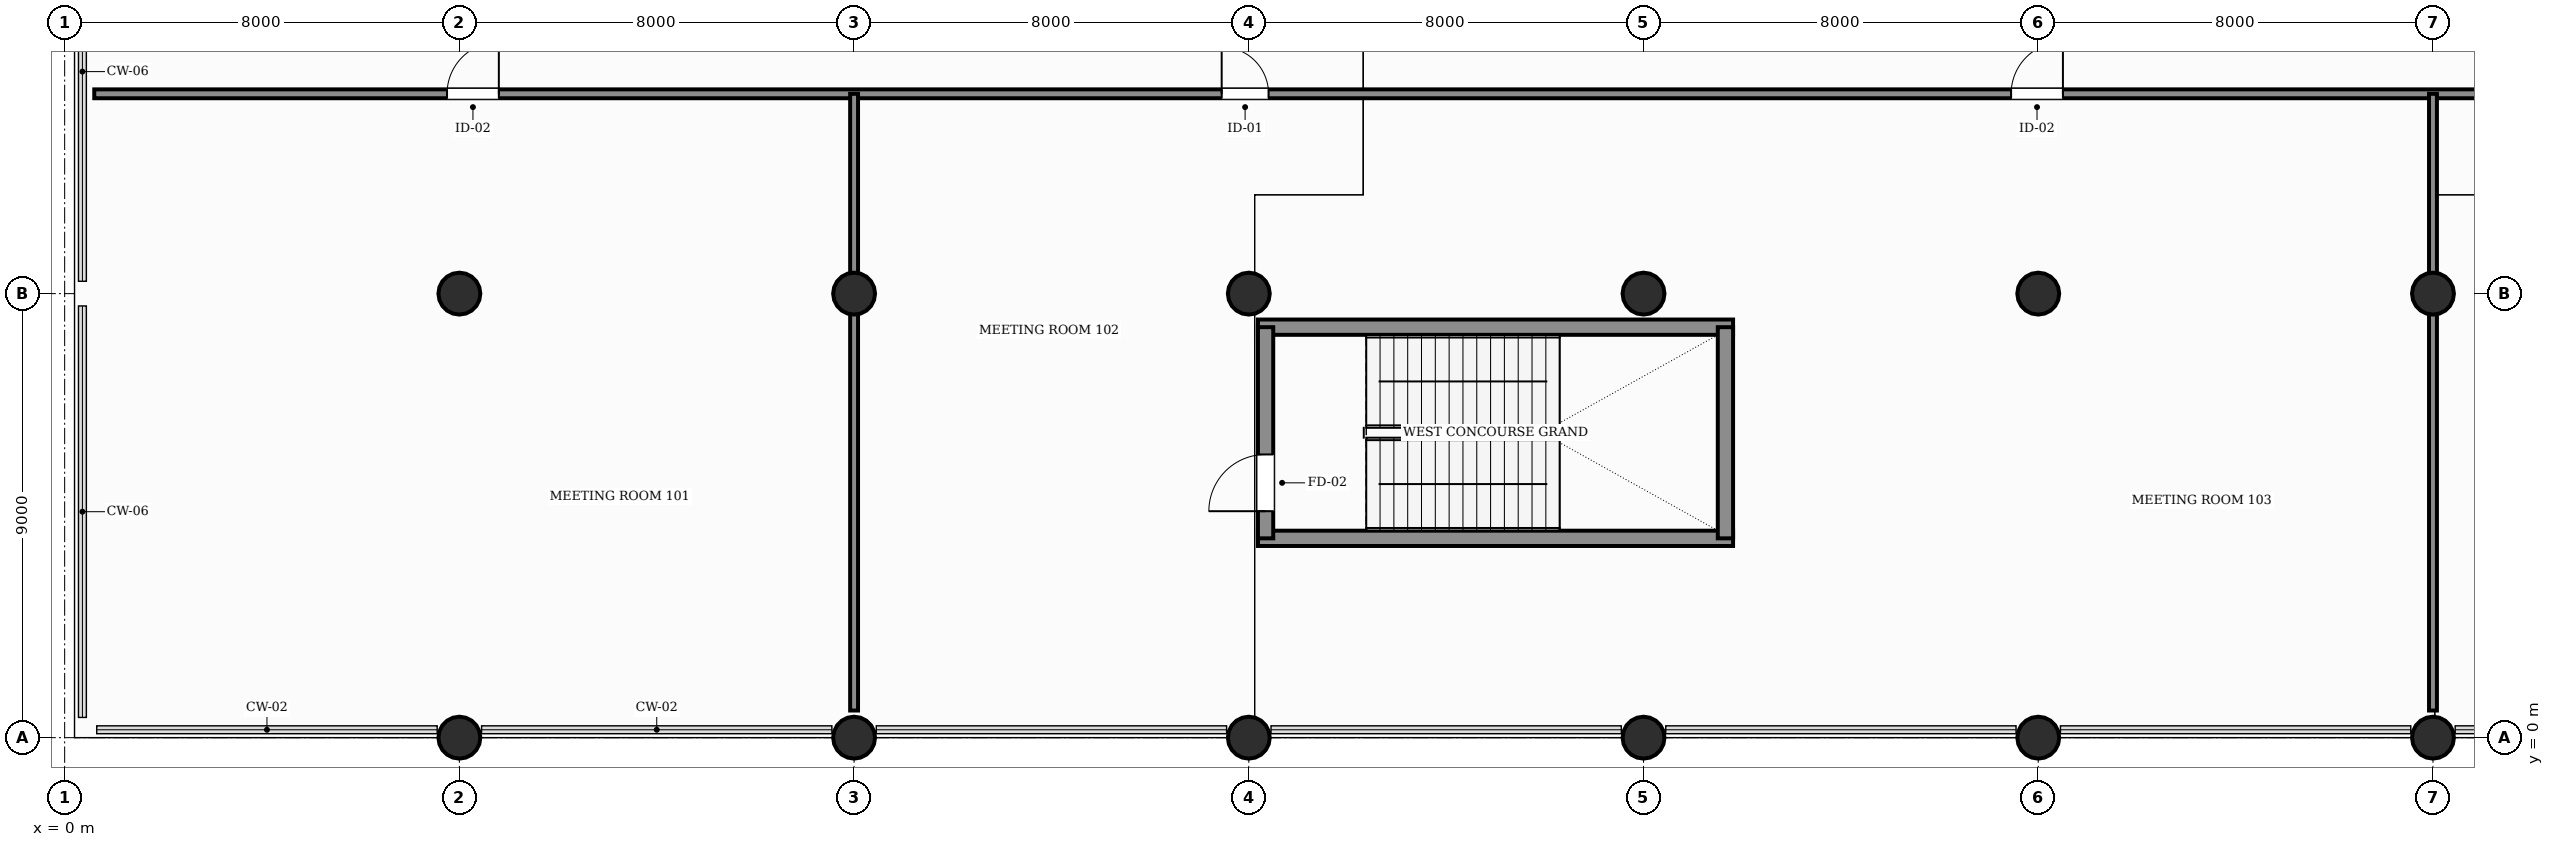
"""IFC4 building model, lengths in metres.
Left out: names, types, materials, properties, quantities, classifications, styles, units other than length and angle.
Written with IfcOpenShell. Run it as: python <this file> out.ifc"""

import sys

from ifc_helpers import new_model, si_unit, direction, frame, frame_2d, origin, origin_2d, place, context, subcontext, project, spatial, rectangle, circle, extrude, element, fill, save


model = new_model("IFC4")
c1 = context("Model", 3, precision=1e-05, world=origin(), true_north=direction((0.0, 1.0)))
c2 = subcontext(c1, "Body", "Model", "MODEL_VIEW")
j1 = project(units=[si_unit("LENGTHUNIT", "METRE"), si_unit("PLANEANGLEUNIT", "RADIAN")], contexts=[c1])
p1 = place(None, origin())
s1 = spatial("IfcSite", under=j1, at=p1, CompositionType="ELEMENT")
p2 = place(p1, origin())
s2 = spatial("IfcBuilding", under=s1, at=p2, CompositionType="ELEMENT")
p3 = place(p2, frame((0.0, 0.0, 6.0)))
s3 = spatial("IfcBuildingStorey", under=s2, at=p3, CompositionType="ELEMENT", Elevation=6.0)
for number, where, z_axis, x_axis in (
    (1, (8.0, 0.0, 0.0), (0.0, 0.0, 1.0), (1.0, 0.0, 0.0)),
    (2, (8.0, 9.0, 0.0), (0.0, 0.0, 1.0), (1.0, 0.0, 0.0)),
    (3, (16.0, 0.0, 0.0), (0.0, 0.0, 1.0), (1.0, 0.0, 0.0)),
    (4, (16.0, 9.0, 0.0), (0.0, 0.0, 1.0), (1.0, 0.0, 0.0)),
    (5, (24.0, 0.0, 0.0), (0.0, 0.0, 1.0), (1.0, 0.0, 0.0)),
    (6, (24.0, 9.0, 0.0), (0.0, 0.0, 1.0), (1.0, 0.0, 0.0)),
    (7, (32.0, 0.0, 0.0), (0.0, 0.0, 1.0), (1.0, 0.0, 0.0)),
    (8, (32.0, 9.0, 0.0), (0.0, 0.0, 1.0), (1.0, 0.0, 0.0)),
    (9, (40.0, 0.0, 0.0), (0.0, 0.0, 1.0), (1.0, 0.0, 0.0)),
    (10, (40.0, 9.0, 0.0), (0.0, 0.0, 1.0), (1.0, 0.0, 0.0)),
    (11, (48.0, 0.0, 0.0), (0.0, 0.0, 1.0), (1.0, 0.0, 0.0)),
    (12, (48.0, 9.0, 0.0), (0.0, 0.0, 1.0), (1.0, 0.0, 0.0)),
):
    element("IfcColumn", number, at=place(p3, frame(where, z_axis=z_axis, x_axis=x_axis)), inside=s3, PredefinedType="COLUMN", context=c2, shape_type="SweptSolid", body=[
        extrude(circle(Radius=0.425, at=origin_2d()), origin(), (0.0, 0.0, 1.0), 5.4),
    ])
for number, where, z_axis, x_axis in (
    (13, (24.185, 4.04, 0.0), (0.0, 0.0, 1.0), (1.0, 0.0, 0.0)),
    (14, (24.185, 8.32, 0.0), (0.0, 0.0, 1.0), (1.0, 0.0, 0.0)),
):
    element("IfcWall", number, at=place(p3, frame(where, z_axis=z_axis, x_axis=x_axis)), inside=s3, PredefinedType="SHEAR", context=c2, shape_type="SweptSolid", body=[
        extrude(rectangle(XDim=9.63, YDim=0.31, at=frame_2d((4.815, 0.0))), origin(), (0.0, 0.0, 1.0), 5.4),
    ])
p4 = place(p3, frame((24.34, 4.04, 0.0), z_axis=(0.0, 0.0, 1.0), x_axis=(0.0, 1.0, 0.0)))
e15 = element("IfcWall", 15, at=p4, inside=s3, PredefinedType="SHEAR", context=c2, shape_type="SweptSolid", body=[
    extrude(rectangle(XDim=4.28, YDim=0.31, at=frame_2d((2.14, 0.0))), origin(), (0.0, 0.0, 1.0), 5.4),
])
p5 = place(p4, frame((0.55, 0.0, 0.0)))
e16 = element("IfcOpeningElement", 16, at=p5, cuts=e15, PredefinedType="OPENING", context=c2, shape_type="SweptSolid", body=[
    extrude(rectangle(XDim=1.15, YDim=2.2, at=frame_2d((0.575, 1.1))), frame((0.0, 0.165, 0.0), z_axis=(0.0, -1.0, 0.0), x_axis=(1.0, 0.0, 0.0)), (0.0, 0.0, 1.0), 0.33),
])
p6 = place(p3, frame((33.66, 4.04, 0.0), z_axis=(0.0, 0.0, 1.0), x_axis=(0.0, 1.0, 0.0)))
e17 = element("IfcWall", 17, at=p6, inside=s3, PredefinedType="SHEAR", context=c2, shape_type="SweptSolid", body=[
    extrude(rectangle(XDim=4.28, YDim=0.31, at=frame_2d((2.14, 0.0))), origin(), (0.0, 0.0, 1.0), 5.4),
])
p7 = place(p3, frame((0.6, 13.05, 0.0), z_axis=(0.0, 0.0, 1.0), x_axis=(1.0, 0.0, 0.0)))
e18 = element("IfcWall", 18, at=p7, inside=s3, PredefinedType="PARTITIONING", context=c2, shape_type="SweptSolid", body=[
    extrude(rectangle(XDim=118.8, YDim=0.18, at=frame_2d((59.4, 0.0))), origin(), (0.0, 0.0, 1.0), 3.85),
])
p8 = place(p7, frame((7.15, 0.0, 0.0)))
e19 = element("IfcOpeningElement", 19, at=p8, cuts=e18, PredefinedType="OPENING", context=c2, shape_type="SweptSolid", body=[
    extrude(rectangle(XDim=1.05, YDim=2.25, at=frame_2d((0.525, 1.125))), frame((0.0, 0.1, 0.0), z_axis=(0.0, -1.0, 0.0), x_axis=(1.0, 0.0, 0.0)), (0.0, 0.0, 1.0), 0.2),
])
p9 = place(p7, frame((22.85, 0.0, 0.0)))
e20 = element("IfcOpeningElement", 20, at=p9, cuts=e18, PredefinedType="OPENING", context=c2, shape_type="SweptSolid", body=[
    extrude(rectangle(XDim=0.95, YDim=2.2, at=frame_2d((0.475, 1.1))), frame((0.0, 0.1, 0.0), z_axis=(0.0, -1.0, 0.0), x_axis=(1.0, 0.0, 0.0)), (0.0, 0.0, 1.0), 0.2),
])
p10 = place(p7, frame((38.85, 0.0, 0.0)))
e21 = element("IfcOpeningElement", 21, at=p10, cuts=e18, PredefinedType="OPENING", context=c2, shape_type="SweptSolid", body=[
    extrude(rectangle(XDim=1.05, YDim=2.25, at=frame_2d((0.525, 1.125))), frame((0.0, 0.1, 0.0), z_axis=(0.0, -1.0, 0.0), x_axis=(1.0, 0.0, 0.0)), (0.0, 0.0, 1.0), 0.2),
])
p11 = place(p7, frame((54.85, 0.0, 0.0)))
e22 = element("IfcOpeningElement", 22, at=p11, cuts=e18, PredefinedType="OPENING", context=c2, shape_type="SweptSolid", body=[
    extrude(rectangle(XDim=0.95, YDim=2.2, at=frame_2d((0.475, 1.1))), frame((0.0, 0.1, 0.0), z_axis=(0.0, -1.0, 0.0), x_axis=(1.0, 0.0, 0.0)), (0.0, 0.0, 1.0), 0.2),
])
p12 = place(p7, frame((70.85, 0.0, 0.0)))
e23 = element("IfcOpeningElement", 23, at=p12, cuts=e18, PredefinedType="OPENING", context=c2, shape_type="SweptSolid", body=[
    extrude(rectangle(XDim=1.05, YDim=2.25, at=frame_2d((0.525, 1.125))), frame((0.0, 0.1, 0.0), z_axis=(0.0, -1.0, 0.0), x_axis=(1.0, 0.0, 0.0)), (0.0, 0.0, 1.0), 0.2),
])
p13 = place(p7, frame((86.85, 0.0, 0.0)))
e24 = element("IfcOpeningElement", 24, at=p13, cuts=e18, PredefinedType="OPENING", context=c2, shape_type="SweptSolid", body=[
    extrude(rectangle(XDim=0.95, YDim=2.2, at=frame_2d((0.475, 1.1))), frame((0.0, 0.1, 0.0), z_axis=(0.0, -1.0, 0.0), x_axis=(1.0, 0.0, 0.0)), (0.0, 0.0, 1.0), 0.2),
])
p14 = place(p7, frame((106.55, 0.0, 0.0)))
e25 = element("IfcOpeningElement", 25, at=p14, cuts=e18, PredefinedType="OPENING", context=c2, shape_type="SweptSolid", body=[
    extrude(rectangle(XDim=1.6, YDim=2.3, at=frame_2d((0.8, 1.15))), frame((0.0, 0.1, 0.0), z_axis=(0.0, -1.0, 0.0), x_axis=(1.0, 0.0, 0.0)), (0.0, 0.0, 1.0), 0.2),
])
for number, where, z_axis, x_axis in (
    (26, (16.0, 0.55, 0.0), (0.0, 0.0, 1.0), (0.0, 1.0, 0.0)),
    (27, (48.0, 0.55, 0.0), (0.0, 0.0, 1.0), (0.0, 1.0, 0.0)),
):
    element("IfcWall", number, at=place(p3, frame(where, z_axis=z_axis, x_axis=x_axis)), inside=s3, PredefinedType="PARTITIONING", context=c2, shape_type="SweptSolid", body=[
        extrude(rectangle(XDim=12.5, YDim=0.16, at=frame_2d((6.25, 0.0))), origin(), (0.0, 0.0, 1.0), 3.85),
    ])
p15 = place(p5, origin())
e28 = element("IfcDoor", 28, at=p15, inside=s3, OperationType="SINGLE_SWING_LEFT", PredefinedType="DOOR", context=c2, shape_type="SweptSolid", body=[
    extrude(rectangle(XDim=1.15, YDim=2.2, at=frame_2d((0.575, 1.1))), frame((0.0, 0.025, 0.0), z_axis=(0.0, -1.0, 0.0), x_axis=(1.0, 0.0, 0.0)), (0.0, 0.0, 1.0), 0.05),
])
fill(e16, e28)
p16 = place(p8, origin())
e29 = element("IfcDoor", 29, at=p16, inside=s3, OperationType="SINGLE_SWING_RIGHT", PredefinedType="DOOR", context=c2, shape_type="SweptSolid", body=[
    extrude(rectangle(XDim=1.05, YDim=2.25, at=frame_2d((0.525, 1.125))), frame((0.0, 0.025, 0.0), z_axis=(0.0, -1.0, 0.0), x_axis=(1.0, 0.0, 0.0)), (0.0, 0.0, 1.0), 0.05),
])
fill(e19, e29)
p17 = place(p9, origin())
e30 = element("IfcDoor", 30, at=p17, inside=s3, OperationType="SINGLE_SWING_LEFT", PredefinedType="DOOR", context=c2, shape_type="SweptSolid", body=[
    extrude(rectangle(XDim=0.95, YDim=2.2, at=frame_2d((0.475, 1.1))), frame((0.0, 0.025, 0.0), z_axis=(0.0, -1.0, 0.0), x_axis=(1.0, 0.0, 0.0)), (0.0, 0.0, 1.0), 0.05),
])
fill(e20, e30)
p18 = place(p10, origin())
e31 = element("IfcDoor", 31, at=p18, inside=s3, OperationType="SINGLE_SWING_RIGHT", PredefinedType="DOOR", context=c2, shape_type="SweptSolid", body=[
    extrude(rectangle(XDim=1.05, YDim=2.25, at=frame_2d((0.525, 1.125))), frame((0.0, 0.025, 0.0), z_axis=(0.0, -1.0, 0.0), x_axis=(1.0, 0.0, 0.0)), (0.0, 0.0, 1.0), 0.05),
])
fill(e21, e31)
save(model, sys.argv[1])
